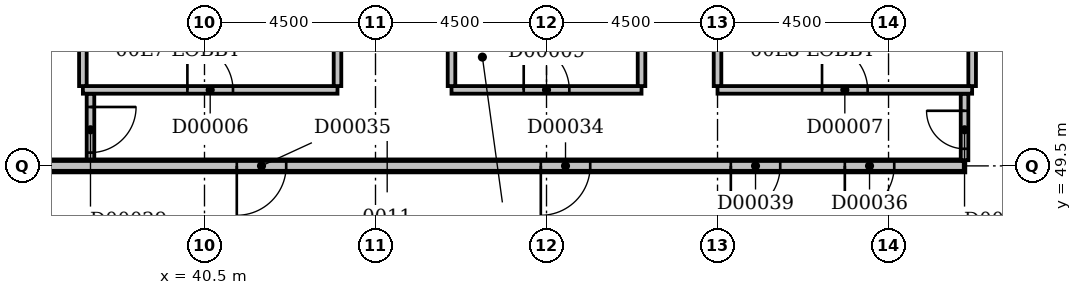
"""IFC4 building model, lengths in metres.
Left out: names, types, materials, properties, quantities, classifications, styles, units other than length and angle.
Written with IfcOpenShell. Run it as: python <this file> out.ifc"""

import sys

from ifc_helpers import new_model, si_unit, direction, frame, frame_2d, origin, place, context, subcontext, project, spatial, rectangle, extrude, element, fill, save


model = new_model("IFC4")
c1 = context("Model", 3, precision=1e-05, world=origin(), true_north=direction((0.0, 1.0)))
c2 = subcontext(c1, "Body", "Model", "MODEL_VIEW")
j1 = project(units=[si_unit("LENGTHUNIT", "METRE"), si_unit("PLANEANGLEUNIT", "RADIAN")], contexts=[c1])
p1 = place(None, origin())
s1 = spatial("IfcSite", under=j1, at=p1, CompositionType="ELEMENT")
p2 = place(p1, origin())
s2 = spatial("IfcBuilding", under=s1, at=p2, CompositionType="ELEMENT")
p3 = place(p2, origin())
s3 = spatial("IfcBuildingStorey", under=s2, at=p3, CompositionType="ELEMENT", Elevation=0.0)
p4 = place(p3, frame((47.0, 51.5, 0.0), z_axis=(0.0, 0.0, 1.0), x_axis=(1.0, 0.0, 0.0)))
e1 = element("IfcWall", 1, at=p4, inside=s3, PredefinedType="PARTITIONING", context=c2, shape_type="SweptSolid", body=[
    extrude(rectangle(XDim=5.0, YDim=0.2, at=frame_2d((2.5, 0.0))), origin(), (0.0, 0.0, 1.0), 8.4),
])
p5 = place(p4, frame((1.9, 0.0, 0.0)))
e2 = element("IfcOpeningElement", 2, at=p5, cuts=e1, PredefinedType="OPENING", context=c2, shape_type="SweptSolid", body=[
    extrude(rectangle(XDim=1.2, YDim=2.1, at=frame_2d((0.6, 1.05))), frame((0.0, 0.112, 0.0), z_axis=(0.0, -1.0, 0.0), x_axis=(1.0, 0.0, 0.0)), (0.0, 0.0, 1.0), 0.224),
])
for number, where, z_axis, x_axis in (
    (3, (52.0, 51.6, 0.0), (0.0, 0.0, 1.0), (0.0, 1.0, 0.0)),
    (4, (47.0, 51.6, 0.0), (0.0, 0.0, 1.0), (0.0, 1.0, 0.0)),
):
    element("IfcWall", number, at=place(p3, frame(where, z_axis=z_axis, x_axis=x_axis)), inside=s3, PredefinedType="PARTITIONING", context=c2, shape_type="SweptSolid", body=[
        extrude(rectangle(XDim=1.98, YDim=0.2, at=frame_2d((0.99, 0.0))), origin(), (0.0, 0.0, 1.0), 8.4),
    ])
p6 = place(p3, frame((37.3, 51.5, 0.0), z_axis=(0.0, 0.0, 1.0), x_axis=(1.0, 0.0, 0.0)))
e5 = element("IfcWall", 5, at=p6, inside=s3, PredefinedType="PARTITIONING", context=c2, shape_type="SweptSolid", body=[
    extrude(rectangle(XDim=6.7, YDim=0.2, at=frame_2d((3.35, 0.0))), origin(), (0.0, 0.0, 1.0), 8.4),
])
p7 = place(p6, frame((2.75, 0.0, 0.0)))
e6 = element("IfcOpeningElement", 6, at=p7, cuts=e5, PredefinedType="OPENING", context=c2, shape_type="SweptSolid", body=[
    extrude(rectangle(XDim=1.2, YDim=2.1, at=frame_2d((0.6, 1.05))), frame((0.0, 0.112, 0.0), z_axis=(0.0, -1.0, 0.0), x_axis=(1.0, 0.0, 0.0)), (0.0, 0.0, 1.0), 0.224),
])
for number, where, z_axis, x_axis in (
    (7, (44.0, 51.6, 0.0), (0.0, 0.0, 1.0), (0.0, 1.0, 0.0)),
    (8, (37.3, 51.6, 0.0), (0.0, 0.0, 1.0), (0.0, 1.0, 0.0)),
):
    element("IfcWall", number, at=place(p3, frame(where, z_axis=z_axis, x_axis=x_axis)), inside=s3, PredefinedType="PARTITIONING", context=c2, shape_type="SweptSolid", body=[
        extrude(rectangle(XDim=1.73, YDim=0.2, at=frame_2d((0.865, 0.0))), origin(), (0.0, 0.0, 1.0), 8.4),
    ])
p8 = place(p3, frame((54.0, 51.5, 0.0), z_axis=(0.0, 0.0, 1.0), x_axis=(1.0, 0.0, 0.0)))
e9 = element("IfcWall", 9, at=p8, inside=s3, PredefinedType="PARTITIONING", context=c2, shape_type="SweptSolid", body=[
    extrude(rectangle(XDim=6.7, YDim=0.2, at=frame_2d((3.35, 0.0))), origin(), (0.0, 0.0, 1.0), 8.4),
])
p9 = place(p8, frame((2.75, 0.0, 0.0)))
e10 = element("IfcOpeningElement", 10, at=p9, cuts=e9, PredefinedType="OPENING", context=c2, shape_type="SweptSolid", body=[
    extrude(rectangle(XDim=1.2, YDim=2.1, at=frame_2d((0.6, 1.05))), frame((0.0, 0.112, 0.0), z_axis=(0.0, -1.0, 0.0), x_axis=(1.0, 0.0, 0.0)), (0.0, 0.0, 1.0), 0.224),
])
p10 = place(p3, frame((60.7, 51.6, 0.0), z_axis=(0.0, 0.0, 1.0), x_axis=(0.0, 1.0, 0.0)))
e11 = element("IfcWall", 11, at=p10, inside=s3, PredefinedType="PARTITIONING", context=c2, shape_type="SweptSolid", body=[
    extrude(rectangle(XDim=1.73, YDim=0.2, at=frame_2d((0.865, 0.0))), origin(), (0.0, 0.0, 1.0), 8.4),
])
p11 = place(p3, frame((54.0, 51.6, 0.0), z_axis=(0.0, 0.0, 1.0), x_axis=(0.0, 1.0, 0.0)))
e12 = element("IfcWall", 12, at=p11, inside=s3, PredefinedType="PARTITIONING", context=c2, shape_type="SweptSolid", body=[
    extrude(rectangle(XDim=1.73, YDim=0.2, at=frame_2d((0.865, 0.0))), origin(), (0.0, 0.0, 1.0), 7.7),
])
p12 = place(p3, frame((60.5, 49.65, 0.0), z_axis=(0.0, 0.0, 1.0), x_axis=(0.0, 1.0, 0.0)))
e13 = element("IfcWall", 13, at=p12, inside=s3, PredefinedType="PARTITIONING", context=c2, shape_type="SweptSolid", body=[
    extrude(rectangle(XDim=1.75, YDim=0.2, at=frame_2d((0.875, 0.0))), origin(), (0.0, 0.0, 1.0), 8.4),
])
p13 = place(p12, frame((0.3, 0.0, 0.0)))
e14 = element("IfcOpeningElement", 14, at=p13, cuts=e13, PredefinedType="OPENING", context=c2, shape_type="SweptSolid", body=[
    extrude(rectangle(XDim=1.0, YDim=2.1, at=frame_2d((0.5, 1.05))), frame((0.0, 0.112, 0.0), z_axis=(0.0, -1.0, 0.0), x_axis=(1.0, 0.0, 0.0)), (0.0, 0.0, 1.0), 0.224),
])
p14 = place(p3, frame((37.5, 51.4, 0.0), z_axis=(0.0, 0.0, 1.0), x_axis=(0.0, -1.0, 0.0)))
e15 = element("IfcWall", 15, at=p14, inside=s3, PredefinedType="PARTITIONING", context=c2, shape_type="SweptSolid", body=[
    extrude(rectangle(XDim=1.75, YDim=0.2, at=frame_2d((0.875, 0.0))), origin(), (0.0, 0.0, 1.0), 8.4),
])
p15 = place(p14, frame((0.35, 0.0, 0.0)))
e16 = element("IfcOpeningElement", 16, at=p15, cuts=e15, PredefinedType="OPENING", context=c2, shape_type="SweptSolid", body=[
    extrude(rectangle(XDim=1.2, YDim=2.1, at=frame_2d((0.6, 1.05))), frame((0.0, 0.112, 0.0), z_axis=(0.0, -1.0, 0.0), x_axis=(1.0, 0.0, 0.0)), (0.0, 0.0, 1.0), 0.224),
])
p16 = place(p3, frame((9.0, 49.5, 0.0), z_axis=(0.0, 0.0, 1.0), x_axis=(1.0, 0.0, 0.0)))
e17 = element("IfcWall", 17, at=p16, inside=s3, PredefinedType="SOLIDWALL", context=c2, shape_type="SweptSolid", body=[
    extrude(rectangle(XDim=51.5, YDim=0.3, at=frame_2d((25.75, 0.0))), origin(), (0.0, 0.0, 1.0), 8.4),
])
p17 = place(p16, frame((19.1, 0.0, 0.0)))
e18 = element("IfcOpeningElement", 18, at=p17, cuts=e17, PredefinedType="OPENING", context=c2, shape_type="SweptSolid", body=[
    extrude(rectangle(XDim=1.8, YDim=2.4, at=frame_2d((0.9, 1.2))), frame((0.0, 0.162, 0.0), z_axis=(0.0, -1.0, 0.0), x_axis=(1.0, 0.0, 0.0)), (0.0, 0.0, 1.0), 0.324),
])
p18 = place(p16, frame((22.1, 0.0, 0.0)))
e19 = element("IfcOpeningElement", 19, at=p18, cuts=e17, PredefinedType="OPENING", context=c2, shape_type="SweptSolid", body=[
    extrude(rectangle(XDim=1.8, YDim=2.4, at=frame_2d((0.9, 1.2))), frame((0.0, 0.162, 0.0), z_axis=(0.0, -1.0, 0.0), x_axis=(1.0, 0.0, 0.0)), (0.0, 0.0, 1.0), 0.324),
])
p19 = place(p16, frame((25.1, 0.0, 0.0)))
e20 = element("IfcOpeningElement", 20, at=p19, cuts=e17, PredefinedType="OPENING", context=c2, shape_type="SweptSolid", body=[
    extrude(rectangle(XDim=1.8, YDim=2.4, at=frame_2d((0.9, 1.2))), frame((0.0, 0.162, 0.0), z_axis=(0.0, -1.0, 0.0), x_axis=(1.0, 0.0, 0.0)), (0.0, 0.0, 1.0), 0.324),
])
p20 = place(p16, frame((40.35, 0.0, 0.0)))
e21 = element("IfcOpeningElement", 21, at=p20, cuts=e17, PredefinedType="OPENING", context=c2, shape_type="SweptSolid", body=[
    extrude(rectangle(XDim=1.3, YDim=2.4, at=frame_2d((0.65, 1.2))), frame((0.0, 0.162, 0.0), z_axis=(0.0, -1.0, 0.0), x_axis=(1.0, 0.0, 0.0)), (0.0, 0.0, 1.0), 0.324),
])
p21 = place(p16, frame((32.35, 0.0, 0.0)))
e22 = element("IfcOpeningElement", 22, at=p21, cuts=e17, PredefinedType="OPENING", context=c2, shape_type="SweptSolid", body=[
    extrude(rectangle(XDim=1.3, YDim=2.4, at=frame_2d((0.65, 1.2))), frame((0.0, 0.162, 0.0), z_axis=(0.0, -1.0, 0.0), x_axis=(1.0, 0.0, 0.0)), (0.0, 0.0, 1.0), 0.324),
])
p22 = place(p16, frame((48.35, 0.0, 0.0)))
e23 = element("IfcOpeningElement", 23, at=p22, cuts=e17, PredefinedType="OPENING", context=c2, shape_type="SweptSolid", body=[
    extrude(rectangle(XDim=1.3, YDim=2.4, at=frame_2d((0.65, 1.2))), frame((0.0, 0.162, 0.0), z_axis=(0.0, -1.0, 0.0), x_axis=(1.0, 0.0, 0.0)), (0.0, 0.0, 1.0), 0.324),
])
p23 = place(p16, frame((1.35, 0.0, 0.0)))
e24 = element("IfcOpeningElement", 24, at=p23, cuts=e17, PredefinedType="OPENING", context=c2, shape_type="SweptSolid", body=[
    extrude(rectangle(XDim=1.3, YDim=2.4, at=frame_2d((0.65, 1.2))), frame((0.0, 0.162, 0.0), z_axis=(0.0, -1.0, 0.0), x_axis=(1.0, 0.0, 0.0)), (0.0, 0.0, 1.0), 0.324),
])
p24 = place(p16, frame((7.35, 0.0, 0.0)))
e25 = element("IfcOpeningElement", 25, at=p24, cuts=e17, PredefinedType="OPENING", context=c2, shape_type="SweptSolid", body=[
    extrude(rectangle(XDim=1.3, YDim=2.4, at=frame_2d((0.65, 1.2))), frame((0.0, 0.162, 0.0), z_axis=(0.0, -1.0, 0.0), x_axis=(1.0, 0.0, 0.0)), (0.0, 0.0, 1.0), 0.324),
])
p25 = place(p16, frame((45.35, 0.0, 0.0)))
e26 = element("IfcOpeningElement", 26, at=p25, cuts=e17, PredefinedType="OPENING", context=c2, shape_type="SweptSolid", body=[
    extrude(rectangle(XDim=1.3, YDim=2.4, at=frame_2d((0.65, 1.2))), frame((0.0, 0.162, 0.0), z_axis=(0.0, -1.0, 0.0), x_axis=(1.0, 0.0, 0.0)), (0.0, 0.0, 1.0), 0.324),
])
p26 = place(p7, origin())
e27 = element("IfcDoor", 27, at=p26, inside=s3, OperationType="SINGLE_SWING_LEFT", PredefinedType="DOOR", context=c2, shape_type="SweptSolid", body=[
    extrude(rectangle(XDim=1.2, YDim=2.1, at=frame_2d((0.6, 1.05))), frame((0.0, 0.025, 0.0), z_axis=(0.0, -1.0, 0.0), x_axis=(1.0, 0.0, 0.0)), (0.0, 0.0, 1.0), 0.05),
])
fill(e6, e27)
p27 = place(p9, origin())
e28 = element("IfcDoor", 28, at=p27, inside=s3, OperationType="SINGLE_SWING_LEFT", PredefinedType="DOOR", context=c2, shape_type="SweptSolid", body=[
    extrude(rectangle(XDim=1.2, YDim=2.1, at=frame_2d((0.6, 1.05))), frame((0.0, 0.025, 0.0), z_axis=(0.0, -1.0, 0.0), x_axis=(1.0, 0.0, 0.0)), (0.0, 0.0, 1.0), 0.05),
])
fill(e10, e28)
p28 = place(p5, origin())
e29 = element("IfcDoor", 29, at=p28, inside=s3, OperationType="SINGLE_SWING_LEFT", PredefinedType="DOOR", context=c2, shape_type="SweptSolid", body=[
    extrude(rectangle(XDim=1.2, YDim=2.1, at=frame_2d((0.6, 1.05))), frame((0.0, 0.025, 0.0), z_axis=(0.0, -1.0, 0.0), x_axis=(1.0, 0.0, 0.0)), (0.0, 0.0, 1.0), 0.05),
])
fill(e2, e29)
p29 = place(p13, frame((1.0, 0.0, 0.0), z_axis=(0.0, 0.0, 1.0), x_axis=(-1.0, 0.0, 0.0)))
e30 = element("IfcDoor", 30, at=p29, inside=s3, OperationType="SINGLE_SWING_LEFT", PredefinedType="DOOR", context=c2, shape_type="SweptSolid", body=[
    extrude(rectangle(XDim=1.0, YDim=2.1, at=frame_2d((0.5, 1.05))), frame((0.0, 0.025, 0.0), z_axis=(0.0, -1.0, 0.0), x_axis=(1.0, 0.0, 0.0)), (0.0, 0.0, 1.0), 0.05),
])
fill(e14, e30)
p30 = place(p15, origin())
e31 = element("IfcDoor", 31, at=p30, inside=s3, OperationType="SINGLE_SWING_LEFT", PredefinedType="DOOR", context=c2, shape_type="SweptSolid", body=[
    extrude(rectangle(XDim=1.2, YDim=2.1, at=frame_2d((0.6, 1.05))), frame((0.0, 0.025, 0.0), z_axis=(0.0, -1.0, 0.0), x_axis=(1.0, 0.0, 0.0)), (0.0, 0.0, 1.0), 0.05),
])
fill(e16, e31)
p31 = place(p20, frame((1.3, 0.0, 0.0), z_axis=(0.0, 0.0, 1.0), x_axis=(-1.0, 0.0, 0.0)))
e32 = element("IfcDoor", 32, at=p31, inside=s3, OperationType="SINGLE_SWING_RIGHT", PredefinedType="DOOR", context=c2, shape_type="SweptSolid", body=[
    extrude(rectangle(XDim=1.3, YDim=2.4, at=frame_2d((0.65, 1.2))), frame((0.0, 0.025, 0.0), z_axis=(0.0, -1.0, 0.0), x_axis=(1.0, 0.0, 0.0)), (0.0, 0.0, 1.0), 0.05),
])
fill(e21, e32)
p32 = place(p21, frame((1.3, 0.0, 0.0), z_axis=(0.0, 0.0, 1.0), x_axis=(-1.0, 0.0, 0.0)))
e33 = element("IfcDoor", 33, at=p32, inside=s3, OperationType="SINGLE_SWING_RIGHT", PredefinedType="DOOR", context=c2, shape_type="SweptSolid", body=[
    extrude(rectangle(XDim=1.3, YDim=2.4, at=frame_2d((0.65, 1.2))), frame((0.0, 0.025, 0.0), z_axis=(0.0, -1.0, 0.0), x_axis=(1.0, 0.0, 0.0)), (0.0, 0.0, 1.0), 0.05),
])
fill(e22, e33)
p33 = place(p22, frame((1.3, 0.0, 0.0), z_axis=(0.0, 0.0, 1.0), x_axis=(-1.0, 0.0, 0.0)))
e34 = element("IfcDoor", 34, at=p33, inside=s3, OperationType="SINGLE_SWING_RIGHT", PredefinedType="DOOR", context=c2, shape_type="SweptSolid", body=[
    extrude(rectangle(XDim=1.3, YDim=2.4, at=frame_2d((0.65, 1.2))), frame((0.0, 0.025, 0.0), z_axis=(0.0, -1.0, 0.0), x_axis=(1.0, 0.0, 0.0)), (0.0, 0.0, 1.0), 0.05),
])
fill(e23, e34)
p34 = place(p25, frame((1.3, 0.0, 0.0), z_axis=(0.0, 0.0, 1.0), x_axis=(-1.0, 0.0, 0.0)))
e35 = element("IfcDoor", 35, at=p34, inside=s3, OperationType="SINGLE_SWING_RIGHT", PredefinedType="DOOR", context=c2, shape_type="SweptSolid", body=[
    extrude(rectangle(XDim=1.3, YDim=2.4, at=frame_2d((0.65, 1.2))), frame((0.0, 0.025, 0.0), z_axis=(0.0, -1.0, 0.0), x_axis=(1.0, 0.0, 0.0)), (0.0, 0.0, 1.0), 0.05),
])
fill(e26, e35)
save(model, sys.argv[1])
